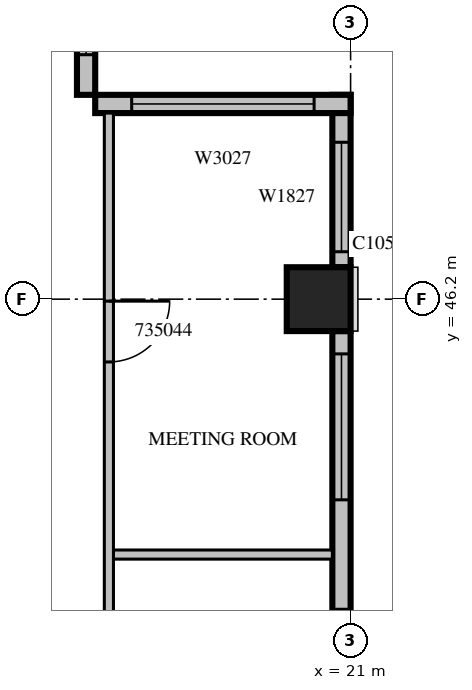
"""IFC4 building model, lengths in metres.
Left out: names, types, materials, properties, quantities, classifications, styles, units other than length and angle.
Written with IfcOpenShell. Run it as: python <this file> out.ifc"""

import sys

from ifc_helpers import new_model, si_unit, direction, frame, frame_2d, origin, origin_2d, place, context, subcontext, project, spatial, rectangle, extrude, source, transform, mapped, element, fill, save


model = new_model("IFC4")
c1 = context("Model", 3, precision=1e-05, world=origin(), true_north=direction((0.0, 1.0)))
c2 = subcontext(c1, "Body", "Model", "MODEL_VIEW")
j1 = project(units=[si_unit("LENGTHUNIT", "METRE"), si_unit("PLANEANGLEUNIT", "RADIAN")], contexts=[c1])
p1 = place(None, origin())
s1 = spatial("IfcSite", under=j1, at=p1, CompositionType="ELEMENT")
p2 = place(p1, origin())
s2 = spatial("IfcBuilding", under=s1, at=p2, CompositionType="ELEMENT")
p3 = place(p2, frame((0.0, 0.0, 158.1)))
s3 = spatial("IfcBuildingStorey", under=s2, at=p3, CompositionType="ELEMENT", Elevation=158.1)
m1 = source(origin(), c2, "Body", "SweptSolid", [
    extrude(rectangle(XDim=1.05, YDim=1.05, at=origin_2d()), origin(), (0.0, 0.0, 1.0), 4.2),
])
p4 = place(p3, frame((20.475, 46.2, 0.0), z_axis=(0.0, 0.0, 1.0), x_axis=(1.0, 0.0, 0.0)))
e1 = element("IfcColumn", 1, at=p4, inside=s3, PredefinedType="COLUMN", context=c2, shape_type="MappedRepresentation", body=[
    mapped(m1, transform((0.0, 0.0, 0.0), scale=1.0)),
])
m2 = source(origin(), c2, "Body", "SweptSolid", [
    extrude(rectangle(XDim=7.35, YDim=0.3, at=frame_2d((3.675, 0.0))), origin(), (0.0, 0.0, 1.0), 3.8),
])
p5 = place(p3, frame((20.85, 38.325, 0.0), z_axis=(0.0, 0.0, 1.0), x_axis=(0.0, 1.0, 0.0)))
e2 = element("IfcWall", 2, at=p5, inside=s3, PredefinedType="STANDARD", context=c2, shape_type="MappedRepresentation", body=[
    mapped(m2, transform((0.0, 0.0, 0.0), scale=1.0)),
])
m3 = source(origin(), c2, "Body", "SweptSolid", [
    extrude(rectangle(XDim=2.4, YDim=2.7, at=frame_2d((1.2, 1.35))), frame((0.0, 0.16, 0.0), z_axis=(0.0, -1.0, 0.0), x_axis=(1.0, 0.0, 0.0)), (0.0, 0.0, 1.0), 0.32),
])
p6 = place(p5, frame((0.375, 0.0, 0.6)))
e3 = element("IfcOpeningElement", 3, at=p6, cuts=e2, PredefinedType="OPENING", context=c2, shape_type="MappedRepresentation", body=[
    mapped(m3, transform((0.0, 0.0, 0.0), scale=1.0)),
])
p7 = place(p5, frame((4.575, 0.0, 0.6)))
e4 = element("IfcOpeningElement", 4, at=p7, cuts=e2, PredefinedType="OPENING", context=c2, shape_type="MappedRepresentation", body=[
    mapped(m3, transform((0.0, 0.0, 0.0), scale=1.0)),
])
m4 = source(origin(), c2, "Body", "SweptSolid", [
    extrude(rectangle(XDim=2.835, YDim=0.3, at=frame_2d((1.417, 0.0))), origin(), (0.0, 0.0, 1.0), 3.8),
])
p8 = place(p3, frame((20.85, 46.725, 0.0), z_axis=(0.0, 0.0, 1.0), x_axis=(0.0, 1.0, 0.0)))
e5 = element("IfcWall", 5, at=p8, inside=s3, PredefinedType="STANDARD", context=c2, shape_type="MappedRepresentation", body=[
    mapped(m4, transform((0.0, 0.0, 0.0), scale=1.0)),
])
m5 = source(origin(), c2, "Body", "SweptSolid", [
    extrude(rectangle(XDim=1.8, YDim=2.7, at=frame_2d((0.9, 1.35))), frame((0.0, 0.16, 0.0), z_axis=(0.0, -1.0, 0.0), x_axis=(1.0, 0.0, 0.0)), (0.0, 0.0, 1.0), 0.32),
])
p9 = place(p8, frame((0.255, 0.0, 0.6)))
e6 = element("IfcOpeningElement", 6, at=p9, cuts=e5, PredefinedType="OPENING", context=c2, shape_type="MappedRepresentation", body=[
    mapped(m5, transform((0.0, 0.0, 0.0), scale=1.0)),
])
m6 = source(origin(), c2, "Body", "SweptSolid", [
    extrude(rectangle(XDim=4.2, YDim=0.3, at=frame_2d((2.1, 0.0))), origin(), (0.0, 0.0, 1.0), 3.8),
])
p10 = place(p3, frame((21.0, 49.41, 0.0), z_axis=(0.0, 0.0, 1.0), x_axis=(-1.0, 0.0, 0.0)))
e7 = element("IfcWall", 7, at=p10, inside=s3, PredefinedType="STANDARD", context=c2, shape_type="MappedRepresentation", body=[
    mapped(m6, transform((0.0, 0.0, 0.0), scale=1.0)),
])
m7 = source(origin(), c2, "Body", "SweptSolid", [
    extrude(rectangle(XDim=3.0, YDim=2.7, at=frame_2d((1.5, 1.35))), frame((0.0, 0.16, 0.0), z_axis=(0.0, -1.0, 0.0), x_axis=(1.0, 0.0, 0.0)), (0.0, 0.0, 1.0), 0.32),
])
p11 = place(p10, frame((0.6, 0.0, 0.6)))
e8 = element("IfcOpeningElement", 8, at=p11, cuts=e7, PredefinedType="OPENING", context=c2, shape_type="MappedRepresentation", body=[
    mapped(m7, transform((0.0, 0.0, 0.0), scale=1.0)),
])
m8 = source(origin(), c2, "Body", "SweptSolid", [
    extrude(rectangle(XDim=2.52, YDim=0.3, at=frame_2d((1.26, 0.0))), origin(), (0.0, 0.0, 1.0), 3.8),
])
p12 = place(p3, frame((16.65, 49.56, 0.0), z_axis=(0.0, 0.0, 1.0), x_axis=(0.0, 1.0, 0.0)))
e9 = element("IfcWall", 9, at=p12, inside=s3, PredefinedType="STANDARD", context=c2, shape_type="MappedRepresentation", body=[
    mapped(m8, transform((0.0, 0.0, 0.0), scale=1.0)),
])
m9 = source(origin(), c2, "Body", "SweptSolid", [
    extrude(rectangle(XDim=1.2, YDim=2.7, at=frame_2d((0.6, 1.35))), frame((0.0, 0.16, 0.0), z_axis=(0.0, -1.0, 0.0), x_axis=(1.0, 0.0, 0.0)), (0.0, 0.0, 1.0), 0.32),
])
p13 = place(p12, frame((0.66, 0.0, 0.6)))
e10 = element("IfcOpeningElement", 10, at=p13, cuts=e9, PredefinedType="OPENING", context=c2, shape_type="MappedRepresentation", body=[
    mapped(m9, transform((0.0, 0.0, 0.0), scale=1.0)),
])
m10 = source(origin(), c2, "Body", "SweptSolid", [
    extrude(rectangle(XDim=3.6, YDim=0.15, at=frame_2d((1.8, 0.0))), origin(), (0.0, 0.0, 1.0), 3.8),
])
p14 = place(p3, frame((20.7, 42.0, 0.0), z_axis=(0.0, 0.0, 1.0), x_axis=(-1.0, 0.0, 0.0)))
e11 = element("IfcWall", 11, at=p14, inside=s3, PredefinedType="PARTITIONING", context=c2, shape_type="MappedRepresentation", body=[
    mapped(m10, transform((0.0, 0.0, 0.0), scale=1.0)),
])
m11 = source(origin(), c2, "Body", "SweptSolid", [
    extrude(rectangle(XDim=19.86, YDim=0.15, at=frame_2d((9.93, 0.0))), origin(), (0.0, 0.0, 1.0), 3.8),
])
p15 = place(p3, frame((17.025, 49.26, 0.0), z_axis=(0.0, 0.0, 1.0), x_axis=(0.0, -1.0, 0.0)))
e12 = element("IfcWall", 12, at=p15, inside=s3, PredefinedType="PARTITIONING", context=c2, shape_type="MappedRepresentation", body=[
    mapped(m11, transform((0.0, 0.0, 0.0), scale=1.0)),
])
m12 = source(origin(), c2, "Body", "SweptSolid", [
    extrude(rectangle(XDim=1.0, YDim=2.1, at=frame_2d((0.5, 1.05))), frame((0.0, 0.085, 0.0), z_axis=(0.0, -1.0, 0.0), x_axis=(1.0, 0.0, 0.0)), (0.0, 0.0, 1.0), 0.17),
])
p16 = place(p15, frame((17.503, 0.0, 0.0)))
e13 = element("IfcOpeningElement", 13, at=p16, cuts=e12, PredefinedType="OPENING", context=c2, shape_type="MappedRepresentation", body=[
    mapped(m12, transform((0.0, 0.0, 0.0), scale=1.0)),
])
p17 = place(p15, frame((14.191, 0.0, 0.0)))
e14 = element("IfcOpeningElement", 14, at=p17, cuts=e12, PredefinedType="OPENING", context=c2, shape_type="MappedRepresentation", body=[
    mapped(m12, transform((0.0, 0.0, 0.0), scale=1.0)),
])
p18 = place(p15, frame((11.848, 0.0, 0.0)))
e15 = element("IfcOpeningElement", 15, at=p18, cuts=e12, PredefinedType="OPENING", context=c2, shape_type="MappedRepresentation", body=[
    mapped(m12, transform((0.0, 0.0, 0.0), scale=1.0)),
])
p19 = place(p15, frame((8.86, 0.0, 0.0)))
e16 = element("IfcOpeningElement", 16, at=p19, cuts=e12, PredefinedType="OPENING", context=c2, shape_type="MappedRepresentation", body=[
    mapped(m12, transform((0.0, 0.0, 0.0), scale=1.0)),
])
p20 = place(p15, frame((3.092, 0.0, 0.0)))
e17 = element("IfcOpeningElement", 17, at=p20, cuts=e12, PredefinedType="OPENING", context=c2, shape_type="MappedRepresentation", body=[
    mapped(m12, transform((0.0, 0.0, 0.0), scale=1.0)),
])
m13 = source(origin(), c2, "Body", "SweptSolid", [
    extrude(rectangle(XDim=2.4, YDim=2.7, at=frame_2d((1.2, 1.35))), frame((0.0, 0.03, 0.0), z_axis=(0.0, -1.0, 0.0), x_axis=(1.0, 0.0, 0.0)), (0.0, 0.0, 1.0), 0.06),
])
p21 = place(p6, origin())
e18 = element("IfcWindow", 18, at=p21, inside=s3, PartitioningType="SINGLE_PANEL", PredefinedType="WINDOW", context=c2, shape_type="MappedRepresentation", body=[
    mapped(m13, transform((0.0, 0.0, 0.0), scale=1.0)),
])
fill(e3, e18)
p22 = place(p7, origin())
e19 = element("IfcWindow", 19, at=p22, inside=s3, PartitioningType="SINGLE_PANEL", PredefinedType="WINDOW", context=c2, shape_type="MappedRepresentation", body=[
    mapped(m13, transform((0.0, 0.0, 0.0), scale=1.0)),
])
fill(e4, e19)
m14 = source(origin(), c2, "Body", "SweptSolid", [
    extrude(rectangle(XDim=1.8, YDim=2.7, at=frame_2d((0.9, 1.35))), frame((0.0, 0.03, 0.0), z_axis=(0.0, -1.0, 0.0), x_axis=(1.0, 0.0, 0.0)), (0.0, 0.0, 1.0), 0.06),
])
p23 = place(p9, origin())
e20 = element("IfcWindow", 20, at=p23, inside=s3, PartitioningType="SINGLE_PANEL", PredefinedType="WINDOW", context=c2, shape_type="MappedRepresentation", body=[
    mapped(m14, transform((0.0, 0.0, 0.0), scale=1.0)),
])
fill(e6, e20)
m15 = source(origin(), c2, "Body", "SweptSolid", [
    extrude(rectangle(XDim=3.0, YDim=2.7, at=frame_2d((1.5, 1.35))), frame((0.0, 0.03, 0.0), z_axis=(0.0, -1.0, 0.0), x_axis=(1.0, 0.0, 0.0)), (0.0, 0.0, 1.0), 0.06),
])
p24 = place(p11, origin())
e21 = element("IfcWindow", 21, at=p24, inside=s3, PartitioningType="SINGLE_PANEL", PredefinedType="WINDOW", context=c2, shape_type="MappedRepresentation", body=[
    mapped(m15, transform((0.0, 0.0, 0.0), scale=1.0)),
])
fill(e8, e21)
m16 = source(origin(), c2, "Body", "SweptSolid", [
    extrude(rectangle(XDim=1.2, YDim=2.7, at=frame_2d((0.6, 1.35))), frame((0.0, 0.03, 0.0), z_axis=(0.0, -1.0, 0.0), x_axis=(1.0, 0.0, 0.0)), (0.0, 0.0, 1.0), 0.06),
])
p25 = place(p13, origin())
e22 = element("IfcWindow", 22, at=p25, inside=s3, PartitioningType="SINGLE_PANEL", PredefinedType="WINDOW", context=c2, shape_type="MappedRepresentation", body=[
    mapped(m16, transform((0.0, 0.0, 0.0), scale=1.0)),
])
fill(e10, e22)
m17 = source(origin(), c2, "Body", "SweptSolid", [
    extrude(rectangle(XDim=1.0, YDim=2.1, at=frame_2d((0.5, 1.05))), frame((0.0, 0.025, 0.0), z_axis=(0.0, -1.0, 0.0), x_axis=(1.0, 0.0, 0.0)), (0.0, 0.0, 1.0), 0.05),
])
p26 = place(p20, origin())
e23 = element("IfcDoor", 23, at=p26, inside=s3, OperationType="SINGLE_SWING_LEFT", PredefinedType="DOOR", context=c2, shape_type="MappedRepresentation", body=[
    mapped(m17, transform((0.0, 0.0, 0.0), scale=1.0)),
])
fill(e17, e23)
save(model, sys.argv[1])
